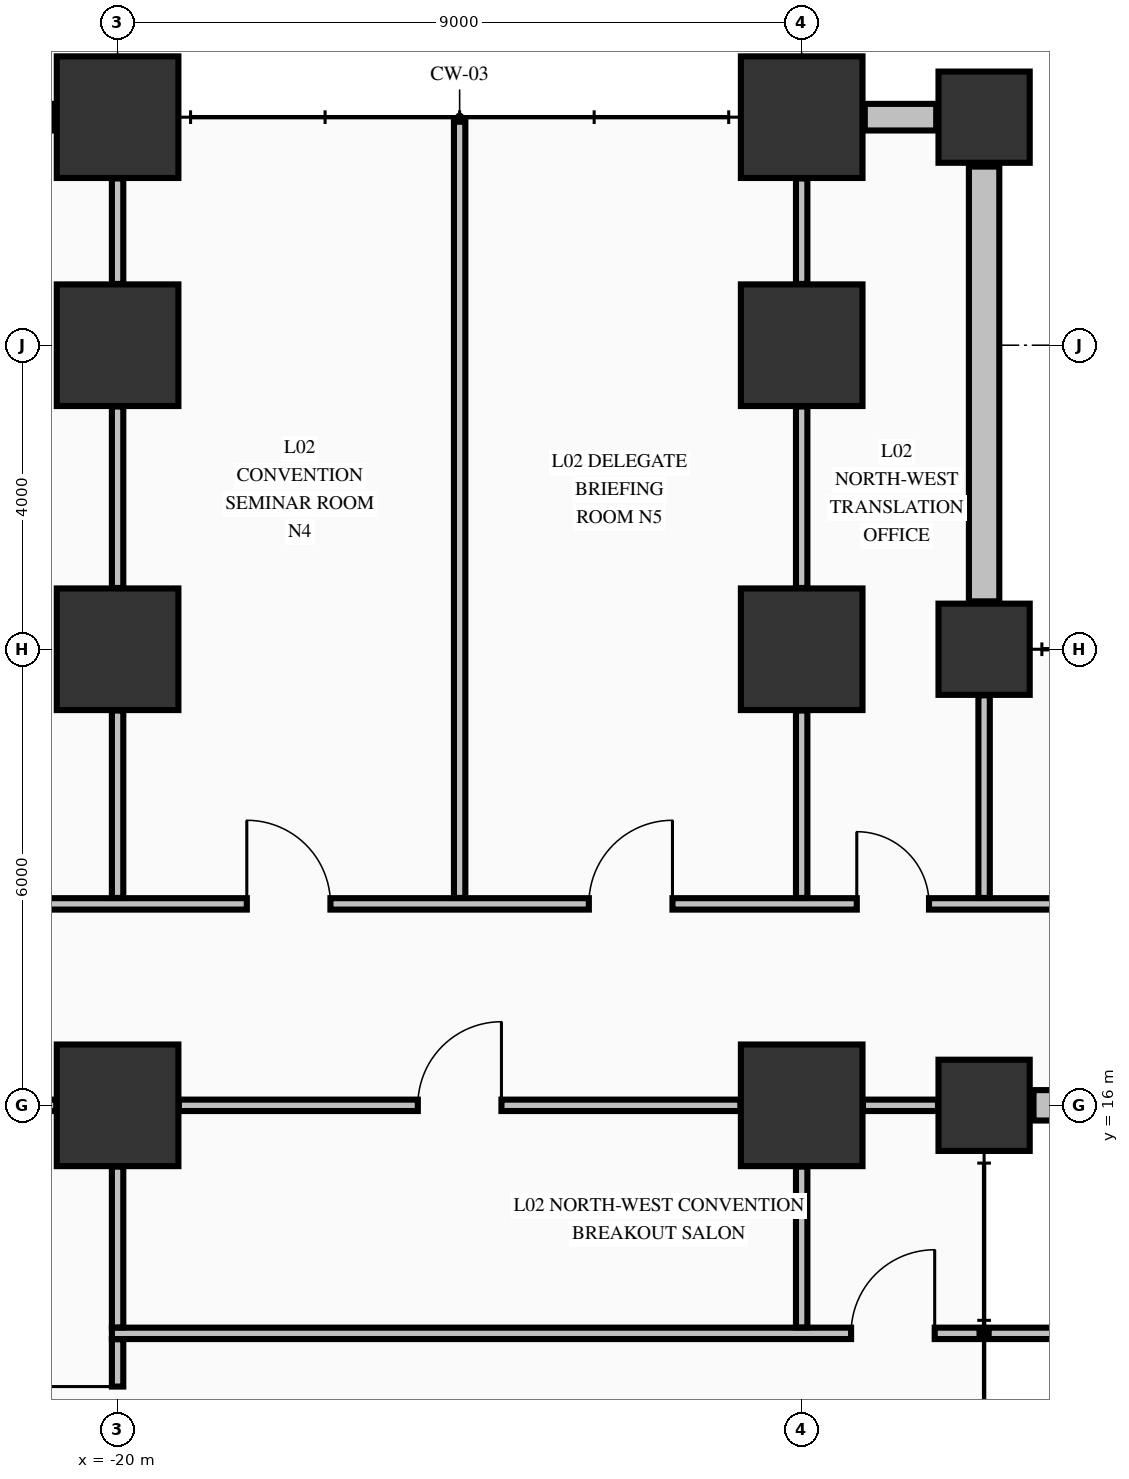
"""IFC4 building model, lengths in metres.
Left out: names, types, materials, properties, quantities, classifications, styles, units other than length and angle.
Written with IfcOpenShell. Run it as: python <this file> out.ifc"""

import sys

from ifc_helpers import new_model, si_unit, direction, frame, frame_2d, origin, origin_2d, place, context, subcontext, project, spatial, rectangle, extrude, element, fill, save


model = new_model("IFC4")
c1 = context("Model", 3, precision=1e-05, world=origin(), true_north=direction((0.0, 1.0)))
c2 = subcontext(c1, "Body", "Model", "MODEL_VIEW")
j1 = project(units=[si_unit("LENGTHUNIT", "METRE"), si_unit("PLANEANGLEUNIT", "RADIAN")], contexts=[c1])
p1 = place(None, origin())
s1 = spatial("IfcSite", under=j1, at=p1, CompositionType="ELEMENT")
p2 = place(p1, origin())
s2 = spatial("IfcBuilding", under=s1, at=p2, CompositionType="ELEMENT")
p3 = place(p2, frame((0.0, 0.0, 10.88)))
s3 = spatial("IfcBuildingStorey", under=s2, at=p3, CompositionType="ELEMENT", Elevation=10.88)
for number, where, z_axis, x_axis in (
    (1, (-20.0, 16.0, 0.0), (0.0, 0.0, 1.0), (1.0, 0.0, 0.0)),
    (2, (-20.0, 22.0, 0.0), (0.0, 0.0, 1.0), (1.0, 0.0, 0.0)),
    (3, (-20.0, 26.0, 0.0), (0.0, 0.0, 1.0), (1.0, 0.0, 0.0)),
    (4, (-20.0, 29.0, 0.0), (0.0, 0.0, 1.0), (1.0, 0.0, 0.0)),
    (5, (-11.0, 16.0, 0.0), (0.0, 0.0, 1.0), (1.0, 0.0, 0.0)),
    (6, (-11.0, 22.0, 0.0), (0.0, 0.0, 1.0), (1.0, 0.0, 0.0)),
    (7, (-11.0, 26.0, 0.0), (0.0, 0.0, 1.0), (1.0, 0.0, 0.0)),
    (8, (-11.0, 29.0, 0.0), (0.0, 0.0, 1.0), (1.0, 0.0, 0.0)),
):
    element("IfcColumn", number, at=place(p3, frame(where, z_axis=z_axis, x_axis=x_axis)), inside=s3, PredefinedType="COLUMN", context=c2, shape_type="SweptSolid", body=[
        extrude(rectangle(XDim=1.6, YDim=1.6, at=origin_2d()), origin(), (0.0, 0.0, 1.0), 5.09),
    ])
for number, where, z_axis, x_axis in (
    (9, (-8.6, 16.0, 0.0), (0.0, 0.0, 1.0), (1.0, 0.0, 0.0)),
    (10, (-8.6, 22.0, 0.0), (0.0, 0.0, 1.0), (1.0, 0.0, 0.0)),
    (11, (-8.6, 29.0, 0.0), (0.0, 0.0, 1.0), (1.0, 0.0, 0.0)),
):
    element("IfcColumn", number, at=place(p3, frame(where, z_axis=z_axis, x_axis=x_axis)), inside=s3, PredefinedType="COLUMN", context=c2, shape_type="SweptSolid", body=[
        extrude(rectangle(XDim=1.2, YDim=1.2, at=origin_2d()), origin(), (0.0, 0.0, 1.0), 5.09),
    ])
p4 = place(p3, frame((-20.83, 29.0, 0.0), z_axis=(0.0, 0.0, 1.0), x_axis=(-1.0, 0.0, 0.0)))
e12 = element("IfcWall", 12, at=p4, inside=s3, PredefinedType="STANDARD", context=c2, shape_type="SweptSolid", body=[
    extrude(rectangle(XDim=1.79, YDim=0.35, at=frame_2d((0.895, 0.0))), origin(), (0.0, 0.0, 1.0), 4.482),
])
p5 = place(p3, frame((-9.23, 29.0, 0.0), z_axis=(0.0, 0.0, 1.0), x_axis=(-1.0, 0.0, 0.0)))
e13 = element("IfcWall", 13, at=p5, inside=s3, PredefinedType="STANDARD", context=c2, shape_type="SweptSolid", body=[
    extrude(rectangle(XDim=0.94, YDim=0.35, at=frame_2d((0.47, 0.0))), origin(), (0.0, 0.0, 1.0), 4.482),
])
p6 = place(p3, frame((-7.95, 16.0, 0.0), z_axis=(0.0, 0.0, 1.0), x_axis=(1.0, 0.0, 0.0)))
e14 = element("IfcWall", 14, at=p6, inside=s3, PredefinedType="STANDARD", context=c2, shape_type="SweptSolid", body=[
    extrude(rectangle(XDim=7.22, YDim=0.4, at=frame_2d((3.61, 0.0))), origin(), (0.0, 0.0, 1.0), 4.132),
])
p7 = place(p3, frame((-8.6, 22.63, 0.0), z_axis=(0.0, 0.0, 1.0), x_axis=(0.0, 1.0, 0.0)))
e15 = element("IfcWall", 15, at=p7, inside=s3, PredefinedType="STANDARD", context=c2, shape_type="SweptSolid", body=[
    extrude(rectangle(XDim=5.72, YDim=0.4, at=frame_2d((2.86, 0.0))), origin(), (0.0, 0.0, 1.0), 4.132),
])
p8 = place(p3, frame((-20.075, 13.0, 0.0), z_axis=(0.0, 0.0, 1.0), x_axis=(1.0, 0.0, 0.0)))
e16 = element("IfcWall", 16, at=p8, inside=s3, PredefinedType="PARTITIONING", context=c2, shape_type="SweptSolid", body=[
    extrude(rectangle(XDim=11.415, YDim=0.15, at=frame_2d((5.708, 0.0))), origin(), (0.0, 0.0, 1.0), 5.09),
])
p9 = place(p8, frame((9.725, 0.0, 0.0)))
e17 = element("IfcOpeningElement", 17, at=p9, cuts=e16, PredefinedType="OPENING", context=c2, shape_type="SweptSolid", body=[
    extrude(rectangle(XDim=1.1, YDim=2.15, at=frame_2d((0.55, 1.075))), frame((0.0, 0.085, 0.0), z_axis=(0.0, -1.0, 0.0), x_axis=(1.0, 0.0, 0.0)), (0.0, 0.0, 1.0), 0.17),
])
p10 = place(p3, frame((-8.54, 13.0, 0.0), z_axis=(0.0, 0.0, 1.0), x_axis=(1.0, 0.0, 0.0)))
e18 = element("IfcWall", 18, at=p10, inside=s3, PredefinedType="PARTITIONING", context=c2, shape_type="SweptSolid", body=[
    extrude(rectangle(XDim=17.08, YDim=0.15, at=frame_2d((8.54, 0.0))), origin(), (0.0, 0.0, 1.0), 5.09),
])
p11 = place(p3, frame((-25.294, 16.0, 0.0), z_axis=(0.0, 0.0, 1.0), x_axis=(1.0, 0.0, 0.0)))
e19 = element("IfcWall", 19, at=p11, inside=s3, PredefinedType="PARTITIONING", context=c2, shape_type="SweptSolid", body=[
    extrude(rectangle(XDim=4.488, YDim=0.15, at=frame_2d((2.244, 0.0))), origin(), (0.0, 0.0, 1.0), 4.132),
])
p12 = place(p11, frame((3.238, 0.0, 0.0)))
e20 = element("IfcOpeningElement", 20, at=p12, cuts=e19, PredefinedType="OPENING", context=c2, shape_type="SweptSolid", body=[
    extrude(rectangle(XDim=1.1, YDim=2.15, at=frame_2d((0.55, 1.075))), frame((0.0, 0.085, 0.0), z_axis=(0.0, -1.0, 0.0), x_axis=(1.0, 0.0, 0.0)), (0.0, 0.0, 1.0), 0.17),
])
p13 = place(p3, frame((-19.194, 16.0, 0.0), z_axis=(0.0, 0.0, 1.0), x_axis=(1.0, 0.0, 0.0)))
e21 = element("IfcWall", 21, at=p13, inside=s3, PredefinedType="PARTITIONING", context=c2, shape_type="SweptSolid", body=[
    extrude(rectangle(XDim=7.388, YDim=0.15, at=frame_2d((3.694, 0.0))), origin(), (0.0, 0.0, 1.0), 4.132),
])
p14 = place(p13, frame((3.144, 0.0, 0.0)))
e22 = element("IfcOpeningElement", 22, at=p14, cuts=e21, PredefinedType="OPENING", context=c2, shape_type="SweptSolid", body=[
    extrude(rectangle(XDim=1.1, YDim=2.15, at=frame_2d((0.55, 1.075))), frame((0.0, 0.085, 0.0), z_axis=(0.0, -1.0, 0.0), x_axis=(1.0, 0.0, 0.0)), (0.0, 0.0, 1.0), 0.17),
])
p15 = place(p3, frame((-10.194, 16.0, 0.0), z_axis=(0.0, 0.0, 1.0), x_axis=(1.0, 0.0, 0.0)))
e23 = element("IfcWall", 23, at=p15, inside=s3, PredefinedType="PARTITIONING", context=c2, shape_type="SweptSolid", body=[
    extrude(rectangle(XDim=0.988, YDim=0.15, at=frame_2d((0.494, 0.0))), origin(), (0.0, 0.0, 1.0), 4.132),
])
p16 = place(p3, frame((-33.835, 18.65, 0.0), z_axis=(0.0, 0.0, 1.0), x_axis=(1.0, 0.0, 0.0)))
e24 = element("IfcWall", 24, at=p16, inside=s3, PredefinedType="PARTITIONING", context=c2, shape_type="SweptSolid", body=[
    extrude(rectangle(XDim=63.685, YDim=0.15, at=frame_2d((31.843, 0.0))), origin(), (0.0, 0.0, 1.0), 5.09),
])
p17 = place(p16, frame((1.285, 0.0, 0.0)))
e25 = element("IfcOpeningElement", 25, at=p17, cuts=e24, PredefinedType="OPENING", context=c2, shape_type="SweptSolid", body=[
    extrude(rectangle(XDim=1.1, YDim=2.15, at=frame_2d((0.55, 1.075))), frame((0.0, 0.085, 0.0), z_axis=(0.0, -1.0, 0.0), x_axis=(1.0, 0.0, 0.0)), (0.0, 0.0, 1.0), 0.17),
])
p18 = place(p16, frame((5.285, 0.0, 0.0)))
e26 = element("IfcOpeningElement", 26, at=p18, cuts=e24, PredefinedType="OPENING", context=c2, shape_type="SweptSolid", body=[
    extrude(rectangle(XDim=1.1, YDim=2.15, at=frame_2d((0.55, 1.075))), frame((0.0, 0.085, 0.0), z_axis=(0.0, -1.0, 0.0), x_axis=(1.0, 0.0, 0.0)), (0.0, 0.0, 1.0), 0.17),
])
p19 = place(p16, frame((10.285, 0.0, 0.0)))
e27 = element("IfcOpeningElement", 27, at=p19, cuts=e24, PredefinedType="OPENING", context=c2, shape_type="SweptSolid", body=[
    extrude(rectangle(XDim=1.1, YDim=2.15, at=frame_2d((0.55, 1.075))), frame((0.0, 0.085, 0.0), z_axis=(0.0, -1.0, 0.0), x_axis=(1.0, 0.0, 0.0)), (0.0, 0.0, 1.0), 0.17),
])
p20 = place(p16, frame((15.535, 0.0, 0.0)))
e28 = element("IfcOpeningElement", 28, at=p20, cuts=e24, PredefinedType="OPENING", context=c2, shape_type="SweptSolid", body=[
    extrude(rectangle(XDim=1.1, YDim=2.15, at=frame_2d((0.55, 1.075))), frame((0.0, 0.085, 0.0), z_axis=(0.0, -1.0, 0.0), x_axis=(1.0, 0.0, 0.0)), (0.0, 0.0, 1.0), 0.17),
])
p21 = place(p16, frame((20.035, 0.0, 0.0)))
e29 = element("IfcOpeningElement", 29, at=p21, cuts=e24, PredefinedType="OPENING", context=c2, shape_type="SweptSolid", body=[
    extrude(rectangle(XDim=1.1, YDim=2.15, at=frame_2d((0.55, 1.075))), frame((0.0, 0.085, 0.0), z_axis=(0.0, -1.0, 0.0), x_axis=(1.0, 0.0, 0.0)), (0.0, 0.0, 1.0), 0.17),
])
p22 = place(p16, frame((23.56, 0.0, 0.0)))
e30 = element("IfcOpeningElement", 30, at=p22, cuts=e24, PredefinedType="OPENING", context=c2, shape_type="SweptSolid", body=[
    extrude(rectangle(XDim=0.95, YDim=2.15, at=frame_2d((0.475, 1.075))), frame((0.0, 0.085, 0.0), z_axis=(0.0, -1.0, 0.0), x_axis=(1.0, 0.0, 0.0)), (0.0, 0.0, 1.0), 0.17),
])
p23 = place(p16, frame((28.985, 0.0, 0.0)))
e31 = element("IfcOpeningElement", 31, at=p23, cuts=e24, PredefinedType="OPENING", context=c2, shape_type="SweptSolid", body=[
    extrude(rectangle(XDim=1.1, YDim=2.15, at=frame_2d((0.55, 1.075))), frame((0.0, 0.085, 0.0), z_axis=(0.0, -1.0, 0.0), x_axis=(1.0, 0.0, 0.0)), (0.0, 0.0, 1.0), 0.17),
])
p24 = place(p16, frame((37.585, 0.0, 0.0)))
e32 = element("IfcOpeningElement", 32, at=p24, cuts=e24, PredefinedType="OPENING", context=c2, shape_type="SweptSolid", body=[
    extrude(rectangle(XDim=1.1, YDim=2.15, at=frame_2d((0.55, 1.075))), frame((0.0, 0.085, 0.0), z_axis=(0.0, -1.0, 0.0), x_axis=(1.0, 0.0, 0.0)), (0.0, 0.0, 1.0), 0.17),
])
p25 = place(p16, frame((43.16, 0.0, 0.0)))
e33 = element("IfcOpeningElement", 33, at=p25, cuts=e24, PredefinedType="OPENING", context=c2, shape_type="SweptSolid", body=[
    extrude(rectangle(XDim=0.95, YDim=2.15, at=frame_2d((0.475, 1.075))), frame((0.0, 0.085, 0.0), z_axis=(0.0, -1.0, 0.0), x_axis=(1.0, 0.0, 0.0)), (0.0, 0.0, 1.0), 0.17),
])
p26 = place(p16, frame((61.31, 0.0, 0.0)))
e34 = element("IfcOpeningElement", 34, at=p26, cuts=e24, PredefinedType="OPENING", context=c2, shape_type="SweptSolid", body=[
    extrude(rectangle(XDim=0.95, YDim=2.15, at=frame_2d((0.475, 1.075))), frame((0.0, 0.085, 0.0), z_axis=(0.0, -1.0, 0.0), x_axis=(1.0, 0.0, 0.0)), (0.0, 0.0, 1.0), 0.17),
])
p27 = place(p16, frame((47.56, 0.0, 0.0)))
e35 = element("IfcOpeningElement", 35, at=p27, cuts=e24, PredefinedType="OPENING", context=c2, shape_type="SweptSolid", body=[
    extrude(rectangle(XDim=0.95, YDim=2.15, at=frame_2d((0.475, 1.075))), frame((0.0, 0.085, 0.0), z_axis=(0.0, -1.0, 0.0), x_axis=(1.0, 0.0, 0.0)), (0.0, 0.0, 1.0), 0.17),
])
p28 = place(p16, frame((51.31, 0.0, 0.0)))
e36 = element("IfcOpeningElement", 36, at=p28, cuts=e24, PredefinedType="OPENING", context=c2, shape_type="SweptSolid", body=[
    extrude(rectangle(XDim=1.05, YDim=2.15, at=frame_2d((0.525, 1.075))), frame((0.0, 0.085, 0.0), z_axis=(0.0, -1.0, 0.0), x_axis=(1.0, 0.0, 0.0)), (0.0, 0.0, 1.0), 0.17),
])
p29 = place(p16, frame((56.06, 0.0, 0.0)))
e37 = element("IfcOpeningElement", 37, at=p29, cuts=e24, PredefinedType="OPENING", context=c2, shape_type="SweptSolid", body=[
    extrude(rectangle(XDim=0.95, YDim=2.15, at=frame_2d((0.475, 1.075))), frame((0.0, 0.085, 0.0), z_axis=(0.0, -1.0, 0.0), x_axis=(1.0, 0.0, 0.0)), (0.0, 0.0, 1.0), 0.17),
])
p30 = place(p16, frame((58.535, 0.0, 0.0)))
e38 = element("IfcOpeningElement", 38, at=p30, cuts=e24, PredefinedType="OPENING", context=c2, shape_type="SweptSolid", body=[
    extrude(rectangle(XDim=0.9, YDim=2.15, at=frame_2d((0.45, 1.075))), frame((0.0, 0.085, 0.0), z_axis=(0.0, -1.0, 0.0), x_axis=(1.0, 0.0, 0.0)), (0.0, 0.0, 1.0), 0.17),
])
p31 = place(p3, frame((-20.0, 10.678, 0.0), z_axis=(0.0, 0.0, 1.0), x_axis=(0.0, 1.0, 0.0)))
e39 = element("IfcWall", 39, at=p31, inside=s3, PredefinedType="PARTITIONING", context=c2, shape_type="SweptSolid", body=[
    extrude(rectangle(XDim=2.244, YDim=0.15, at=frame_2d((1.122, 0.0))), origin(), (0.0, 0.0, 1.0), 4.132),
])
p32 = place(p31, frame((0.522, 0.0, 0.0)))
e40 = element("IfcOpeningElement", 40, at=p32, cuts=e39, PredefinedType="OPENING", context=c2, shape_type="SweptSolid", body=[
    extrude(rectangle(XDim=1.1, YDim=2.15, at=frame_2d((0.55, 1.075))), frame((0.0, 0.085, 0.0), z_axis=(0.0, -1.0, 0.0), x_axis=(1.0, 0.0, 0.0)), (0.0, 0.0, 1.0), 0.17),
])
p33 = place(p3, frame((-20.0, 13.078, 0.0), z_axis=(0.0, 0.0, 1.0), x_axis=(0.0, 1.0, 0.0)))
e41 = element("IfcWall", 41, at=p33, inside=s3, PredefinedType="PARTITIONING", context=c2, shape_type="SweptSolid", body=[
    extrude(rectangle(XDim=2.116, YDim=0.15, at=frame_2d((1.058, 0.0))), origin(), (0.0, 0.0, 1.0), 4.132),
])
p34 = place(p3, frame((-20.0, 18.728, 0.0), z_axis=(0.0, 0.0, 1.0), x_axis=(0.0, 1.0, 0.0)))
e42 = element("IfcWall", 42, at=p34, inside=s3, PredefinedType="PARTITIONING", context=c2, shape_type="SweptSolid", body=[
    extrude(rectangle(XDim=2.466, YDim=0.15, at=frame_2d((1.233, 0.0))), origin(), (0.0, 0.0, 1.0), 4.132),
])
p35 = place(p3, frame((-20.0, 22.806, 0.0), z_axis=(0.0, 0.0, 1.0), x_axis=(0.0, 1.0, 0.0)))
e43 = element("IfcWall", 43, at=p35, inside=s3, PredefinedType="PARTITIONING", context=c2, shape_type="SweptSolid", body=[
    extrude(rectangle(XDim=2.388, YDim=0.15, at=frame_2d((1.194, 0.0))), origin(), (0.0, 0.0, 1.0), 4.132),
])
p36 = place(p3, frame((-20.0, 26.806, 0.0), z_axis=(0.0, 0.0, 1.0), x_axis=(0.0, 1.0, 0.0)))
e44 = element("IfcWall", 44, at=p36, inside=s3, PredefinedType="PARTITIONING", context=c2, shape_type="SweptSolid", body=[
    extrude(rectangle(XDim=1.388, YDim=0.15, at=frame_2d((0.694, 0.0))), origin(), (0.0, 0.0, 1.0), 4.132),
])
p37 = place(p3, frame((-15.5, 18.728, 0.0), z_axis=(0.0, 0.0, 1.0), x_axis=(0.0, 1.0, 0.0)))
e45 = element("IfcWall", 45, at=p37, inside=s3, PredefinedType="PARTITIONING", context=c2, shape_type="SweptSolid", body=[
    extrude(rectangle(XDim=10.212, YDim=0.15, at=frame_2d((5.106, 0.0))), origin(), (0.0, 0.0, 1.0), 5.09),
])
p38 = place(p3, frame((-11.0, 13.078, 0.0), z_axis=(0.0, 0.0, 1.0), x_axis=(0.0, 1.0, 0.0)))
e46 = element("IfcWall", 46, at=p38, inside=s3, PredefinedType="PARTITIONING", context=c2, shape_type="SweptSolid", body=[
    extrude(rectangle(XDim=2.116, YDim=0.15, at=frame_2d((1.058, 0.0))), origin(), (0.0, 0.0, 1.0), 4.132),
])
p39 = place(p3, frame((-11.0, 18.728, 0.0), z_axis=(0.0, 0.0, 1.0), x_axis=(0.0, 1.0, 0.0)))
e47 = element("IfcWall", 47, at=p39, inside=s3, PredefinedType="PARTITIONING", context=c2, shape_type="SweptSolid", body=[
    extrude(rectangle(XDim=2.466, YDim=0.15, at=frame_2d((1.233, 0.0))), origin(), (0.0, 0.0, 1.0), 4.132),
])
p40 = place(p3, frame((-11.0, 22.806, 0.0), z_axis=(0.0, 0.0, 1.0), x_axis=(0.0, 1.0, 0.0)))
e48 = element("IfcWall", 48, at=p40, inside=s3, PredefinedType="PARTITIONING", context=c2, shape_type="SweptSolid", body=[
    extrude(rectangle(XDim=2.388, YDim=0.15, at=frame_2d((1.194, 0.0))), origin(), (0.0, 0.0, 1.0), 4.132),
])
p41 = place(p3, frame((-11.0, 26.806, 0.0), z_axis=(0.0, 0.0, 1.0), x_axis=(0.0, 1.0, 0.0)))
e49 = element("IfcWall", 49, at=p41, inside=s3, PredefinedType="PARTITIONING", context=c2, shape_type="SweptSolid", body=[
    extrude(rectangle(XDim=1.388, YDim=0.15, at=frame_2d((0.694, 0.0))), origin(), (0.0, 0.0, 1.0), 4.132),
])
p42 = place(p3, frame((-8.6, 18.728, 0.0), z_axis=(0.0, 0.0, 1.0), x_axis=(0.0, 1.0, 0.0)))
e50 = element("IfcWall", 50, at=p42, inside=s3, PredefinedType="PARTITIONING", context=c2, shape_type="SweptSolid", body=[
    extrude(rectangle(XDim=2.666, YDim=0.15, at=frame_2d((1.333, 0.0))), origin(), (0.0, 0.0, 1.0), 4.132),
])
p43 = place(p14, origin())
e51 = element("IfcDoor", 51, at=p43, inside=s3, OperationType="SINGLE_SWING_RIGHT", PredefinedType="DOOR", context=c2, shape_type="SweptSolid", body=[
    extrude(rectangle(XDim=1.1, YDim=2.15, at=frame_2d((0.55, 1.075))), frame((0.0, 0.025, 0.0), z_axis=(0.0, -1.0, 0.0), x_axis=(1.0, 0.0, 0.0)), (0.0, 0.0, 1.0), 0.05),
])
fill(e22, e51)
p44 = place(p9, origin())
e52 = element("IfcDoor", 52, at=p44, inside=s3, OperationType="SINGLE_SWING_RIGHT", PredefinedType="DOOR", context=c2, shape_type="SweptSolid", body=[
    extrude(rectangle(XDim=1.1, YDim=2.15, at=frame_2d((0.55, 1.075))), frame((0.0, 0.025, 0.0), z_axis=(0.0, -1.0, 0.0), x_axis=(1.0, 0.0, 0.0)), (0.0, 0.0, 1.0), 0.05),
])
fill(e17, e52)
p45 = place(p32, origin())
e53 = element("IfcDoor", 53, at=p45, inside=s3, OperationType="SINGLE_SWING_RIGHT", PredefinedType="DOOR", context=c2, shape_type="SweptSolid", body=[
    extrude(rectangle(XDim=1.1, YDim=2.15, at=frame_2d((0.55, 1.075))), frame((0.0, 0.025, 0.0), z_axis=(0.0, -1.0, 0.0), x_axis=(1.0, 0.0, 0.0)), (0.0, 0.0, 1.0), 0.05),
])
fill(e40, e53)
p46 = place(p20, origin())
e54 = element("IfcDoor", 54, at=p46, inside=s3, OperationType="SINGLE_SWING_LEFT", PredefinedType="DOOR", context=c2, shape_type="SweptSolid", body=[
    extrude(rectangle(XDim=1.1, YDim=2.15, at=frame_2d((0.55, 1.075))), frame((0.0, 0.025, 0.0), z_axis=(0.0, -1.0, 0.0), x_axis=(1.0, 0.0, 0.0)), (0.0, 0.0, 1.0), 0.05),
])
fill(e28, e54)
p47 = place(p21, origin())
e55 = element("IfcDoor", 55, at=p47, inside=s3, OperationType="SINGLE_SWING_RIGHT", PredefinedType="DOOR", context=c2, shape_type="SweptSolid", body=[
    extrude(rectangle(XDim=1.1, YDim=2.15, at=frame_2d((0.55, 1.075))), frame((0.0, 0.025, 0.0), z_axis=(0.0, -1.0, 0.0), x_axis=(1.0, 0.0, 0.0)), (0.0, 0.0, 1.0), 0.05),
])
fill(e29, e55)
p48 = place(p22, origin())
e56 = element("IfcDoor", 56, at=p48, inside=s3, OperationType="SINGLE_SWING_LEFT", PredefinedType="DOOR", context=c2, shape_type="SweptSolid", body=[
    extrude(rectangle(XDim=0.95, YDim=2.15, at=frame_2d((0.475, 1.075))), frame((0.0, 0.025, 0.0), z_axis=(0.0, -1.0, 0.0), x_axis=(1.0, 0.0, 0.0)), (0.0, 0.0, 1.0), 0.05),
])
fill(e30, e56)
save(model, sys.argv[1])
